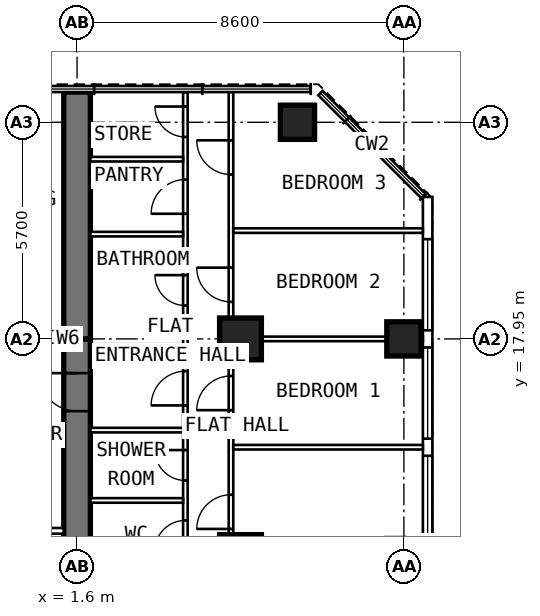
"""IFC4 building model, lengths in metres.
Left out: names, types, materials, properties, quantities, classifications, styles, units other than length and angle.
Written with IfcOpenShell. Run it as: python <this file> out.ifc"""

import sys

from ifc_helpers import new_model, si_unit, direction, frame, frame_2d, origin, origin_2d, place, context, subcontext, project, spatial, rectangle, extrude, element, fill, save


model = new_model("IFC4")
c1 = context("Model", 3, precision=1e-05, world=origin(), true_north=direction((0.0, 1.0)))
c2 = subcontext(c1, "Body", "Model", "MODEL_VIEW")
j1 = project(units=[si_unit("LENGTHUNIT", "METRE"), si_unit("PLANEANGLEUNIT", "RADIAN")], contexts=[c1])
p1 = place(None, origin())
s1 = spatial("IfcSite", under=j1, at=p1, CompositionType="ELEMENT")
p2 = place(p1, origin())
s2 = spatial("IfcBuilding", under=s1, at=p2, CompositionType="ELEMENT")
p3 = place(p2, frame((0.0, 0.0, 222.6)))
s3 = spatial("IfcBuildingStorey", under=s2, at=p3, CompositionType="ELEMENT", Elevation=222.6)
for number, where, z_axis, x_axis in (
    (1, (10.2, 17.95, 0.0), (0.0, 0.0, 1.0), (0.0, 1.0, 0.0)),
    (2, (7.4, 23.65, 0.0), (0.0, 0.0, 1.0), (0.0, 1.0, 0.0)),
):
    element("IfcColumn", number, at=place(p3, frame(where, z_axis=z_axis, x_axis=x_axis)), inside=s3, PredefinedType="COLUMN", context=c2, shape_type="SweptSolid", body=[
        extrude(rectangle(XDim=0.9, YDim=0.9, at=origin_2d()), origin(), (0.0, 0.0, 1.0), 3.6),
    ])
for number, where, z_axis, x_axis in (
    (3, (5.9, 12.25, 0.0), (0.0, 0.0, 1.0), (0.0, 1.0, 0.0)),
    (4, (5.9, 17.95, 0.0), (0.0, 0.0, 1.0), (0.0, 1.0, 0.0)),
):
    element("IfcColumn", number, at=place(p3, frame(where, z_axis=z_axis, x_axis=x_axis)), inside=s3, PredefinedType="COLUMN", context=c2, shape_type="SweptSolid", body=[
        extrude(rectangle(XDim=1.1, YDim=1.1, at=origin_2d()), origin(), (0.0, 0.0, 1.0), 3.6),
    ])
p4 = place(p3, frame((1.6, 9.6, 0.0), z_axis=(0.0, 0.0, 1.0), x_axis=(0.0, 1.0, 0.0)))
e5 = element("IfcWall", 5, at=p4, inside=s3, PredefinedType="SHEAR", context=c2, shape_type="SweptSolid", body=[
    extrude(rectangle(XDim=8.35, YDim=0.7, at=frame_2d((4.175, 0.0))), origin(), (0.0, 0.0, 1.0), 3.6),
])
p5 = place(p4, frame((6.45, 0.0, 0.0)))
e6 = element("IfcOpeningElement", 6, at=p5, cuts=e5, PredefinedType="OPENING", context=c2, shape_type="SweptSolid", body=[
    extrude(rectangle(XDim=1.0, YDim=2.1, at=frame_2d((0.5, 1.05))), frame((0.0, 0.362, 0.0), z_axis=(0.0, -1.0, 0.0), x_axis=(1.0, 0.0, 0.0)), (0.0, 0.0, 1.0), 0.724),
])
p6 = place(p3, frame((1.6, 17.95, 0.0), z_axis=(0.0, 0.0, 1.0), x_axis=(0.0, 1.0, 0.0)))
e7 = element("IfcWall", 7, at=p6, inside=s3, PredefinedType="SHEAR", context=c2, shape_type="SweptSolid", body=[
    extrude(rectangle(XDim=6.495, YDim=0.7, at=frame_2d((3.248, 0.0))), origin(), (0.0, 0.0, 1.0), 3.6),
])
p7 = place(p3, frame((10.825, 6.409, 0.0), z_axis=(0.0, 0.0, 1.0), x_axis=(0.0, 1.0, 0.0)))
e8 = element("IfcWall", 8, at=p7, inside=s3, PredefinedType="SOLIDWALL", context=c2, shape_type="SweptSolid", body=[
    extrude(rectangle(XDim=15.276, YDim=0.25, at=frame_2d((7.638, 0.0))), origin(), (0.0, 0.0, 1.0), 3.35),
])
p8 = place(p7, frame((0.366, 0.0, 0.8)))
e9 = element("IfcOpeningElement", 9, at=p8, cuts=e8, PredefinedType="OPENING", context=c2, shape_type="SweptSolid", body=[
    extrude(rectangle(XDim=2.4, YDim=1.8, at=frame_2d((1.2, 0.9))), frame((0.0, 0.137, 0.0), z_axis=(0.0, -1.0, 0.0), x_axis=(1.0, 0.0, 0.0)), (0.0, 0.0, 1.0), 0.274),
])
p9 = place(p7, frame((3.216, 0.0, 0.8)))
e10 = element("IfcOpeningElement", 10, at=p9, cuts=e8, PredefinedType="OPENING", context=c2, shape_type="SweptSolid", body=[
    extrude(rectangle(XDim=2.4, YDim=1.8, at=frame_2d((1.2, 0.9))), frame((0.0, 0.137, 0.0), z_axis=(0.0, -1.0, 0.0), x_axis=(1.0, 0.0, 0.0)), (0.0, 0.0, 1.0), 0.274),
])
p10 = place(p7, frame((6.066, 0.0, 0.8)))
e11 = element("IfcOpeningElement", 11, at=p10, cuts=e8, PredefinedType="OPENING", context=c2, shape_type="SweptSolid", body=[
    extrude(rectangle(XDim=2.4, YDim=1.8, at=frame_2d((1.2, 0.9))), frame((0.0, 0.137, 0.0), z_axis=(0.0, -1.0, 0.0), x_axis=(1.0, 0.0, 0.0)), (0.0, 0.0, 1.0), 0.274),
])
p11 = place(p7, frame((8.916, 0.0, 0.8)))
e12 = element("IfcOpeningElement", 12, at=p11, cuts=e8, PredefinedType="OPENING", context=c2, shape_type="SweptSolid", body=[
    extrude(rectangle(XDim=2.4, YDim=1.8, at=frame_2d((1.2, 0.9))), frame((0.0, 0.137, 0.0), z_axis=(0.0, -1.0, 0.0), x_axis=(1.0, 0.0, 0.0)), (0.0, 0.0, 1.0), 0.274),
])
p12 = place(p7, frame((11.766, 0.0, 0.8)))
e13 = element("IfcOpeningElement", 13, at=p12, cuts=e8, PredefinedType="OPENING", context=c2, shape_type="SweptSolid", body=[
    extrude(rectangle(XDim=2.4, YDim=1.8, at=frame_2d((1.2, 0.9))), frame((0.0, 0.137, 0.0), z_axis=(0.0, -1.0, 0.0), x_axis=(1.0, 0.0, 0.0)), (0.0, 0.0, 1.0), 0.274),
])
p13 = place(p3, frame((4.45, 9.925, 0.0), z_axis=(0.0, 0.0, 1.0), x_axis=(0.0, 1.0, 0.0)))
e14 = element("IfcWall", 14, at=p13, inside=s3, PredefinedType="PARTITIONING", context=c2, shape_type="SweptSolid", body=[
    extrude(rectangle(XDim=14.52, YDim=0.12, at=frame_2d((7.26, 0.0))), origin(), (0.0, 0.0, 1.0), 3.35),
])
p14 = place(p13, frame((0.55, 0.0, 0.0)))
e15 = element("IfcOpeningElement", 15, at=p14, cuts=e14, PredefinedType="OPENING", context=c2, shape_type="SweptSolid", body=[
    extrude(rectangle(XDim=0.9, YDim=2.1, at=frame_2d((0.45, 1.05))), frame((0.0, 0.072, 0.0), z_axis=(0.0, -1.0, 0.0), x_axis=(1.0, 0.0, 0.0)), (0.0, 0.0, 1.0), 0.144),
])
p15 = place(p13, frame((2.45, 0.0, 0.0)))
e16 = element("IfcOpeningElement", 16, at=p15, cuts=e14, PredefinedType="OPENING", context=c2, shape_type="SweptSolid", body=[
    extrude(rectangle(XDim=0.8, YDim=2.1, at=frame_2d((0.4, 1.05))), frame((0.0, 0.072, 0.0), z_axis=(0.0, -1.0, 0.0), x_axis=(1.0, 0.0, 0.0)), (0.0, 0.0, 1.0), 0.144),
])
p16 = place(p13, frame((4.3, 0.0, 0.0)))
e17 = element("IfcOpeningElement", 17, at=p16, cuts=e14, PredefinedType="OPENING", context=c2, shape_type="SweptSolid", body=[
    extrude(rectangle(XDim=0.8, YDim=2.1, at=frame_2d((0.4, 1.05))), frame((0.0, 0.072, 0.0), z_axis=(0.0, -1.0, 0.0), x_axis=(1.0, 0.0, 0.0)), (0.0, 0.0, 1.0), 0.144),
])
p17 = place(p13, frame((6.275, 0.0, 0.0)))
e18 = element("IfcOpeningElement", 18, at=p17, cuts=e14, PredefinedType="OPENING", context=c2, shape_type="SweptSolid", body=[
    extrude(rectangle(XDim=0.9, YDim=2.1, at=frame_2d((0.45, 1.05))), frame((0.0, 0.072, 0.0), z_axis=(0.0, -1.0, 0.0), x_axis=(1.0, 0.0, 0.0)), (0.0, 0.0, 1.0), 0.144),
])
p18 = place(p13, frame((8.904, 0.0, 0.0)))
e19 = element("IfcOpeningElement", 19, at=p18, cuts=e14, PredefinedType="OPENING", context=c2, shape_type="SweptSolid", body=[
    extrude(rectangle(XDim=0.8, YDim=2.1, at=frame_2d((0.4, 1.05))), frame((0.0, 0.072, 0.0), z_axis=(0.0, -1.0, 0.0), x_axis=(1.0, 0.0, 0.0)), (0.0, 0.0, 1.0), 0.144),
])
p19 = place(p13, frame((11.318, 0.0, 0.0)))
e20 = element("IfcOpeningElement", 20, at=p19, cuts=e14, PredefinedType="OPENING", context=c2, shape_type="SweptSolid", body=[
    extrude(rectangle(XDim=0.9, YDim=2.1, at=frame_2d((0.45, 1.05))), frame((0.0, 0.072, 0.0), z_axis=(0.0, -1.0, 0.0), x_axis=(1.0, 0.0, 0.0)), (0.0, 0.0, 1.0), 0.144),
])
p20 = place(p13, frame((13.339, 0.0, 0.0)))
e21 = element("IfcOpeningElement", 21, at=p20, cuts=e14, PredefinedType="OPENING", context=c2, shape_type="SweptSolid", body=[
    extrude(rectangle(XDim=0.8, YDim=2.1, at=frame_2d((0.4, 1.05))), frame((0.0, 0.072, 0.0), z_axis=(0.0, -1.0, 0.0), x_axis=(1.0, 0.0, 0.0)), (0.0, 0.0, 1.0), 0.144),
])
p21 = place(p3, frame((5.65, 9.6, 0.0), z_axis=(0.0, 0.0, 1.0), x_axis=(0.0, 1.0, 0.0)))
e22 = element("IfcWall", 22, at=p21, inside=s3, PredefinedType="PARTITIONING", context=c2, shape_type="SweptSolid", body=[
    extrude(rectangle(XDim=14.845, YDim=0.12, at=frame_2d((7.422, 0.0))), origin(), (0.0, 0.0, 1.0), 3.35),
])
p22 = place(p21, frame((3.35, 0.0, 0.0)))
e23 = element("IfcOpeningElement", 23, at=p22, cuts=e22, PredefinedType="OPENING", context=c2, shape_type="SweptSolid", body=[
    extrude(rectangle(XDim=0.9, YDim=2.1, at=frame_2d((0.45, 1.05))), frame((0.0, 0.072, 0.0), z_axis=(0.0, -1.0, 0.0), x_axis=(1.0, 0.0, 0.0)), (0.0, 0.0, 1.0), 0.144),
])
p23 = place(p21, frame((6.475, 0.0, 0.0)))
e24 = element("IfcOpeningElement", 24, at=p23, cuts=e22, PredefinedType="OPENING", context=c2, shape_type="SweptSolid", body=[
    extrude(rectangle(XDim=0.9, YDim=2.1, at=frame_2d((0.45, 1.05))), frame((0.0, 0.072, 0.0), z_axis=(0.0, -1.0, 0.0), x_axis=(1.0, 0.0, 0.0)), (0.0, 0.0, 1.0), 0.144),
])
p24 = place(p21, frame((9.325, 0.0, 0.0)))
e25 = element("IfcOpeningElement", 25, at=p24, cuts=e22, PredefinedType="OPENING", context=c2, shape_type="SweptSolid", body=[
    extrude(rectangle(XDim=0.9, YDim=2.1, at=frame_2d((0.45, 1.05))), frame((0.0, 0.072, 0.0), z_axis=(0.0, -1.0, 0.0), x_axis=(1.0, 0.0, 0.0)), (0.0, 0.0, 1.0), 0.144),
])
p25 = place(p21, frame((12.675, 0.0, 0.0)))
e26 = element("IfcOpeningElement", 26, at=p25, cuts=e22, PredefinedType="OPENING", context=c2, shape_type="SweptSolid", body=[
    extrude(rectangle(XDim=0.9, YDim=2.1, at=frame_2d((0.45, 1.05))), frame((0.0, 0.072, 0.0), z_axis=(0.0, -1.0, 0.0), x_axis=(1.0, 0.0, 0.0)), (0.0, 0.0, 1.0), 0.144),
])
p26 = place(p3, frame((5.71, 15.1, 0.0), z_axis=(0.0, 0.0, 1.0), x_axis=(1.0, 0.0, 0.0)))
e27 = element("IfcWall", 27, at=p26, inside=s3, PredefinedType="PARTITIONING", context=c2, shape_type="SweptSolid", body=[
    extrude(rectangle(XDim=4.99, YDim=0.12, at=frame_2d((2.495, 0.0))), origin(), (0.0, 0.0, 1.0), 3.35),
])
p27 = place(p3, frame((5.71, 17.95, 0.0), z_axis=(0.0, 0.0, 1.0), x_axis=(1.0, 0.0, 0.0)))
e28 = element("IfcWall", 28, at=p27, inside=s3, PredefinedType="PARTITIONING", context=c2, shape_type="SweptSolid", body=[
    extrude(rectangle(XDim=4.99, YDim=0.12, at=frame_2d((2.495, 0.0))), origin(), (0.0, 0.0, 1.0), 2.45),
])
p28 = place(p3, frame((5.71, 20.8, 0.0), z_axis=(0.0, 0.0, 1.0), x_axis=(1.0, 0.0, 0.0)))
e29 = element("IfcWall", 29, at=p28, inside=s3, PredefinedType="PARTITIONING", context=c2, shape_type="SweptSolid", body=[
    extrude(rectangle(XDim=4.99, YDim=0.12, at=frame_2d((2.495, 0.0))), origin(), (0.0, 0.0, 1.0), 3.35),
])
for number, where, z_axis, x_axis in (
    (30, (1.95, 13.7, 0.0), (0.0, 0.0, 1.0), (1.0, 0.0, 0.0)),
    (31, (1.95, 15.55, 0.0), (0.0, 0.0, 1.0), (1.0, 0.0, 0.0)),
):
    element("IfcWall", number, at=place(p3, frame(where, z_axis=z_axis, x_axis=x_axis)), inside=s3, PredefinedType="PARTITIONING", context=c2, shape_type="SweptSolid", body=[
        extrude(rectangle(XDim=2.44, YDim=0.12, at=frame_2d((1.22, 0.0))), origin(), (0.0, 0.0, 1.0), 3.35),
    ])
p29 = place(p3, frame((1.95, 17.75, 0.0), z_axis=(0.0, 0.0, 1.0), x_axis=(1.0, 0.0, 0.0)))
e32 = element("IfcWall", 32, at=p29, inside=s3, PredefinedType="PARTITIONING", context=c2, shape_type="SweptSolid", body=[
    extrude(rectangle(XDim=2.44, YDim=0.12, at=frame_2d((1.22, 0.0))), origin(), (0.0, 0.0, 1.0), 2.45),
])
for number, where, z_axis, x_axis in (
    (33, (1.95, 20.707, 0.0), (0.0, 0.0, 1.0), (1.0, 0.0, 0.0)),
    (34, (1.95, 22.678, 0.0), (0.0, 0.0, 1.0), (1.0, 0.0, 0.0)),
):
    element("IfcWall", number, at=place(p3, frame(where, z_axis=z_axis, x_axis=x_axis)), inside=s3, PredefinedType="PARTITIONING", context=c2, shape_type="SweptSolid", body=[
        extrude(rectangle(XDim=2.44, YDim=0.12, at=frame_2d((1.22, 0.0))), origin(), (0.0, 0.0, 1.0), 3.35),
    ])
p30 = place(p3, frame((1.25, 17.95, 0.0), z_axis=(0.0, 0.0, 1.0), x_axis=(-1.0, 0.0, 0.0)))
e35 = element("IfcWall", 35, at=p30, inside=s3, PredefinedType="PARTITIONING", context=c2, shape_type="SweptSolid", body=[
    extrude(rectangle(XDim=2.5, YDim=0.15, at=frame_2d((1.25, 0.0))), origin(), (0.0, 0.0, 1.0), 3.35),
])
p31 = place(p30, frame((0.75, 0.0, 0.0)))
e36 = element("IfcOpeningElement", 36, at=p31, cuts=e35, PredefinedType="OPENING", context=c2, shape_type="SweptSolid", body=[
    extrude(rectangle(XDim=1.0, YDim=2.1, at=frame_2d((0.5, 1.05))), frame((0.0, 0.087, 0.0), z_axis=(0.0, -1.0, 0.0), x_axis=(1.0, 0.0, 0.0)), (0.0, 0.0, 1.0), 0.174),
])
p32 = place(p3, frame((1.25, 12.9, 0.0), z_axis=(0.0, 0.0, 1.0), x_axis=(-1.0, 0.0, 0.0)))
e37 = element("IfcWall", 37, at=p32, inside=s3, PredefinedType="PARTITIONING", context=c2, shape_type="SweptSolid", body=[
    extrude(rectangle(XDim=2.5, YDim=0.15, at=frame_2d((1.25, 0.0))), origin(), (0.0, 0.0, 1.0), 3.35),
])
p33 = place(p32, frame((0.75, 0.0, 0.0)))
e38 = element("IfcOpeningElement", 38, at=p33, cuts=e37, PredefinedType="OPENING", context=c2, shape_type="SweptSolid", body=[
    extrude(rectangle(XDim=1.0, YDim=2.1, at=frame_2d((0.5, 1.05))), frame((0.0, 0.087, 0.0), z_axis=(0.0, -1.0, 0.0), x_axis=(1.0, 0.0, 0.0)), (0.0, 0.0, 1.0), 0.174),
])
p34 = place(p10, origin())
e39 = element("IfcWindow", 39, at=p34, inside=s3, PartitioningType="SINGLE_PANEL", PredefinedType="WINDOW", context=c2, shape_type="SweptSolid", body=[
    extrude(rectangle(XDim=2.4, YDim=1.8, at=frame_2d((1.2, 0.9))), frame((0.0, 0.03, 0.0), z_axis=(0.0, -1.0, 0.0), x_axis=(1.0, 0.0, 0.0)), (0.0, 0.0, 1.0), 0.06),
])
fill(e11, e39)
p35 = place(p11, origin())
e40 = element("IfcWindow", 40, at=p35, inside=s3, PartitioningType="SINGLE_PANEL", PredefinedType="WINDOW", context=c2, shape_type="SweptSolid", body=[
    extrude(rectangle(XDim=2.4, YDim=1.8, at=frame_2d((1.2, 0.9))), frame((0.0, 0.03, 0.0), z_axis=(0.0, -1.0, 0.0), x_axis=(1.0, 0.0, 0.0)), (0.0, 0.0, 1.0), 0.06),
])
fill(e12, e40)
p36 = place(p12, origin())
e41 = element("IfcWindow", 41, at=p36, inside=s3, PartitioningType="SINGLE_PANEL", PredefinedType="WINDOW", context=c2, shape_type="SweptSolid", body=[
    extrude(rectangle(XDim=2.4, YDim=1.8, at=frame_2d((1.2, 0.9))), frame((0.0, 0.03, 0.0), z_axis=(0.0, -1.0, 0.0), x_axis=(1.0, 0.0, 0.0)), (0.0, 0.0, 1.0), 0.06),
])
fill(e13, e41)
p37 = place(p5, origin())
e42 = element("IfcDoor", 42, at=p37, inside=s3, OperationType="SINGLE_SWING_RIGHT", PredefinedType="DOOR", context=c2, shape_type="SweptSolid", body=[
    extrude(rectangle(XDim=1.0, YDim=2.1, at=frame_2d((0.5, 1.05))), frame((0.0, 0.1, 0.0), z_axis=(0.0, -1.0, 0.0), x_axis=(1.0, 0.0, 0.0)), (0.0, 0.0, 1.0), 0.2),
])
fill(e6, e42)
p38 = place(p22, origin())
e43 = element("IfcDoor", 43, at=p38, inside=s3, OperationType="SINGLE_SWING_LEFT", PredefinedType="DOOR", context=c2, shape_type="SweptSolid", body=[
    extrude(rectangle(XDim=0.9, YDim=2.1, at=frame_2d((0.45, 1.05))), frame((0.0, 0.025, 0.0), z_axis=(0.0, -1.0, 0.0), x_axis=(1.0, 0.0, 0.0)), (0.0, 0.0, 1.0), 0.05),
])
fill(e23, e43)
p39 = place(p23, origin())
e44 = element("IfcDoor", 44, at=p39, inside=s3, OperationType="SINGLE_SWING_LEFT", PredefinedType="DOOR", context=c2, shape_type="SweptSolid", body=[
    extrude(rectangle(XDim=0.9, YDim=2.1, at=frame_2d((0.45, 1.05))), frame((0.0, 0.025, 0.0), z_axis=(0.0, -1.0, 0.0), x_axis=(1.0, 0.0, 0.0)), (0.0, 0.0, 1.0), 0.05),
])
fill(e24, e44)
p40 = place(p24, origin())
e45 = element("IfcDoor", 45, at=p40, inside=s3, OperationType="SINGLE_SWING_RIGHT", PredefinedType="DOOR", context=c2, shape_type="SweptSolid", body=[
    extrude(rectangle(XDim=0.9, YDim=2.1, at=frame_2d((0.45, 1.05))), frame((0.0, 0.025, 0.0), z_axis=(0.0, -1.0, 0.0), x_axis=(1.0, 0.0, 0.0)), (0.0, 0.0, 1.0), 0.05),
])
fill(e25, e45)
p41 = place(p25, origin())
e46 = element("IfcDoor", 46, at=p41, inside=s3, OperationType="SINGLE_SWING_RIGHT", PredefinedType="DOOR", context=c2, shape_type="SweptSolid", body=[
    extrude(rectangle(XDim=0.9, YDim=2.1, at=frame_2d((0.45, 1.05))), frame((0.0, 0.025, 0.0), z_axis=(0.0, -1.0, 0.0), x_axis=(1.0, 0.0, 0.0)), (0.0, 0.0, 1.0), 0.05),
])
fill(e26, e46)
p42 = place(p15, origin())
e47 = element("IfcDoor", 47, at=p42, inside=s3, OperationType="SINGLE_SWING_LEFT", PredefinedType="DOOR", context=c2, shape_type="SweptSolid", body=[
    extrude(rectangle(XDim=0.8, YDim=2.1, at=frame_2d((0.4, 1.05))), frame((0.0, 0.025, 0.0), z_axis=(0.0, -1.0, 0.0), x_axis=(1.0, 0.0, 0.0)), (0.0, 0.0, 1.0), 0.05),
])
fill(e16, e47)
p43 = place(p16, origin())
e48 = element("IfcDoor", 48, at=p43, inside=s3, OperationType="SINGLE_SWING_RIGHT", PredefinedType="DOOR", context=c2, shape_type="SweptSolid", body=[
    extrude(rectangle(XDim=0.8, YDim=2.1, at=frame_2d((0.4, 1.05))), frame((0.0, 0.025, 0.0), z_axis=(0.0, -1.0, 0.0), x_axis=(1.0, 0.0, 0.0)), (0.0, 0.0, 1.0), 0.05),
])
fill(e17, e48)
p44 = place(p17, origin())
e49 = element("IfcDoor", 49, at=p44, inside=s3, OperationType="SINGLE_SWING_LEFT", PredefinedType="DOOR", context=c2, shape_type="SweptSolid", body=[
    extrude(rectangle(XDim=0.9, YDim=2.1, at=frame_2d((0.45, 1.05))), frame((0.0, 0.025, 0.0), z_axis=(0.0, -1.0, 0.0), x_axis=(1.0, 0.0, 0.0)), (0.0, 0.0, 1.0), 0.05),
])
fill(e18, e49)
p45 = place(p18, origin())
e50 = element("IfcDoor", 50, at=p45, inside=s3, OperationType="SINGLE_SWING_RIGHT", PredefinedType="DOOR", context=c2, shape_type="SweptSolid", body=[
    extrude(rectangle(XDim=0.8, YDim=2.1, at=frame_2d((0.4, 1.05))), frame((0.0, 0.025, 0.0), z_axis=(0.0, -1.0, 0.0), x_axis=(1.0, 0.0, 0.0)), (0.0, 0.0, 1.0), 0.05),
])
fill(e19, e50)
p46 = place(p19, origin())
e51 = element("IfcDoor", 51, at=p46, inside=s3, OperationType="SINGLE_SWING_LEFT", PredefinedType="DOOR", context=c2, shape_type="SweptSolid", body=[
    extrude(rectangle(XDim=0.9, YDim=2.1, at=frame_2d((0.45, 1.05))), frame((0.0, 0.025, 0.0), z_axis=(0.0, -1.0, 0.0), x_axis=(1.0, 0.0, 0.0)), (0.0, 0.0, 1.0), 0.05),
])
fill(e20, e51)
p47 = place(p20, origin())
e52 = element("IfcDoor", 52, at=p47, inside=s3, OperationType="SINGLE_SWING_RIGHT", PredefinedType="DOOR", context=c2, shape_type="SweptSolid", body=[
    extrude(rectangle(XDim=0.8, YDim=2.1, at=frame_2d((0.4, 1.05))), frame((0.0, 0.025, 0.0), z_axis=(0.0, -1.0, 0.0), x_axis=(1.0, 0.0, 0.0)), (0.0, 0.0, 1.0), 0.05),
])
fill(e21, e52)
save(model, sys.argv[1])
